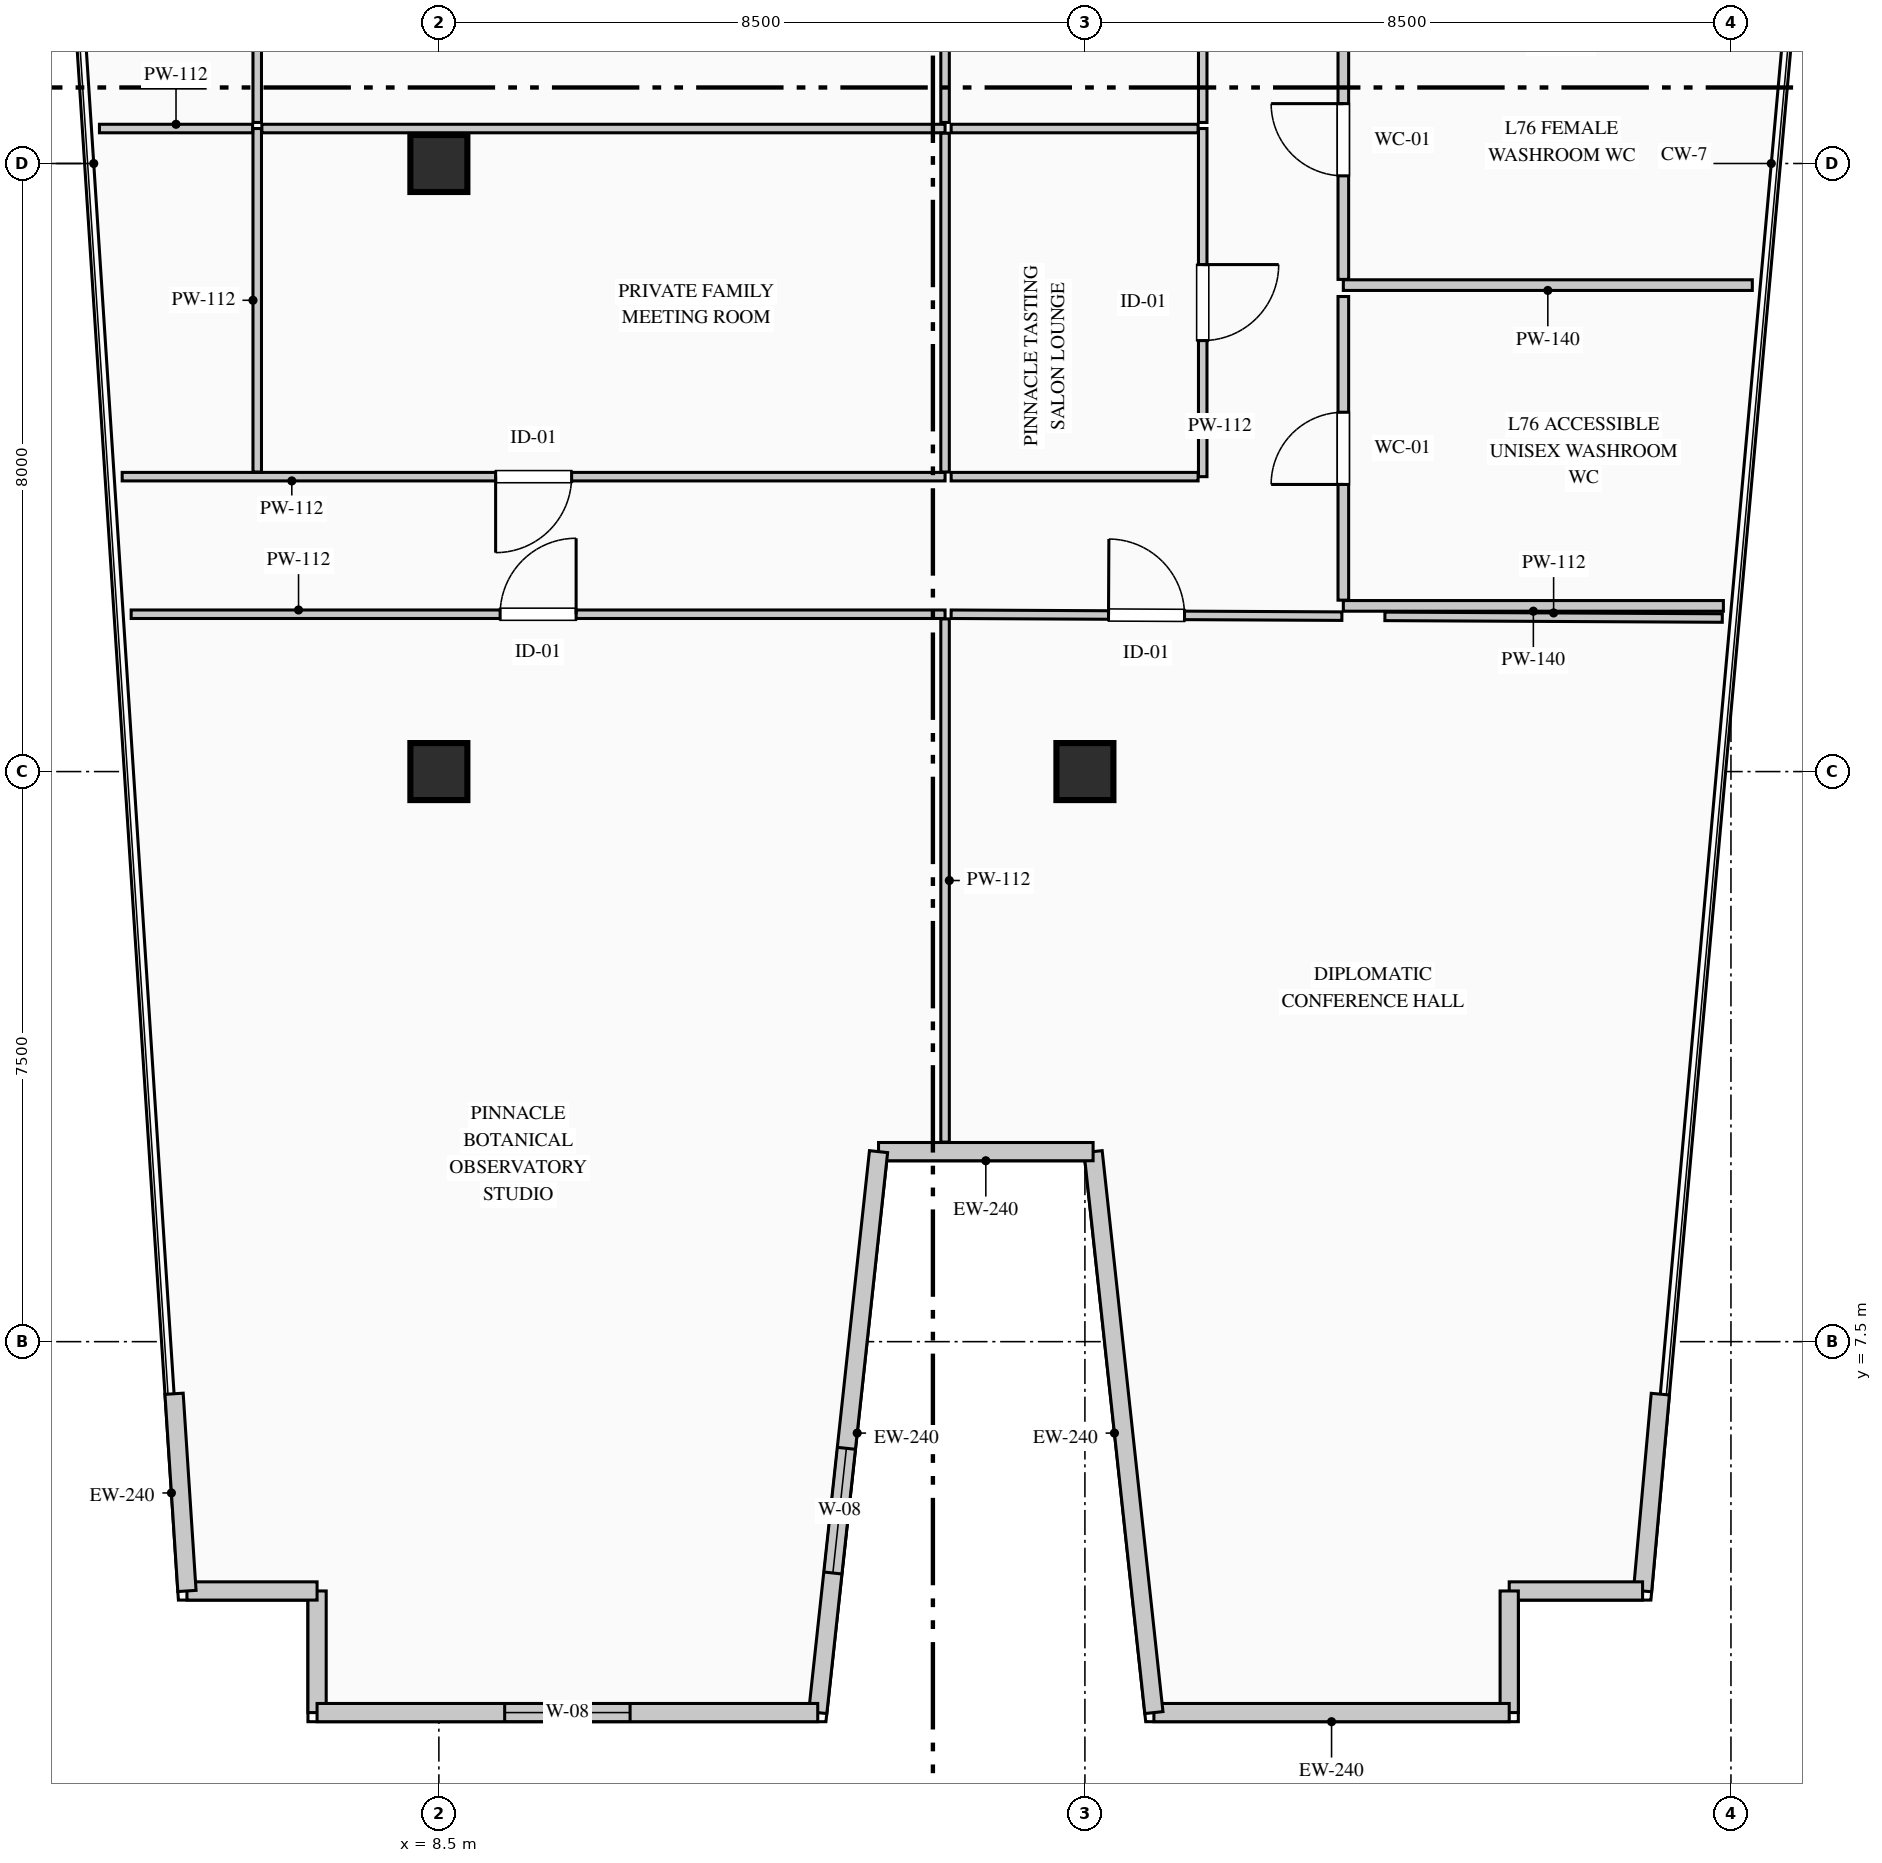
"""IFC4 building model, lengths in metres.
Left out: names, types, materials, properties, quantities, classifications, styles, units other than length and angle.
Written with IfcOpenShell. Run it as: python <this file> out.ifc"""

import sys

from ifc_helpers import new_model, si_unit, direction, frame, frame_2d, origin, origin_2d, place, context, subcontext, project, spatial, rectangle, extrude, element, fill, save


model = new_model("IFC4")
c1 = context("Model", 3, precision=1e-05, world=origin(), true_north=direction((0.0, 1.0)))
c2 = subcontext(c1, "Body", "Model", "MODEL_VIEW")
j1 = project(units=[si_unit("LENGTHUNIT", "METRE"), si_unit("PLANEANGLEUNIT", "RADIAN")], contexts=[c1])
p1 = place(None, origin())
s1 = spatial("IfcSite", under=j1, at=p1, CompositionType="ELEMENT")
p2 = place(p1, origin())
s2 = spatial("IfcBuilding", under=s1, at=p2, CompositionType="ELEMENT")
p3 = place(p2, frame((0.0, 0.0, 315.95)))
s3 = spatial("IfcBuildingStorey", under=s2, at=p3, CompositionType="ELEMENT", Elevation=315.95)
for number, where, z_axis, x_axis in (
    (1, (8.5, 15.0, 0.0), (0.0, 0.0, 1.0), (1.0, 0.0, 0.0)),
    (2, (8.5, 23.0, 0.0), (0.0, 0.0, 1.0), (1.0, 0.0, 0.0)),
    (3, (17.0, 15.0, 0.0), (0.0, 0.0, 1.0), (1.0, 0.0, 0.0)),
):
    element("IfcColumn", number, at=place(p3, frame(where, z_axis=z_axis, x_axis=x_axis)), inside=s3, PredefinedType="COLUMN", context=c2, shape_type="SweptSolid", body=[
        extrude(rectangle(XDim=0.75, YDim=0.75, at=origin_2d()), origin(), (0.0, 0.0, 1.0), 3.95),
    ])
p4 = place(p3, frame((6.897, 2.62, 0.0), z_axis=(0.0, 0.0, 1.0), x_axis=(0.0, 1.0, 0.0)))
e4 = element("IfcWall", 4, at=p4, inside=s3, PredefinedType="STANDARD", context=c2, shape_type="SweptSolid", body=[
    extrude(rectangle(XDim=1.6, YDim=0.24, at=frame_2d((0.8, 0.0))), origin(), (0.0, 0.0, 1.0), 3.7),
])
p5 = place(p3, frame((6.897, 4.22, 0.0), z_axis=(0.0, 0.0, 1.0), x_axis=(-1.0, 0.0, 0.0)))
e5 = element("IfcWall", 5, at=p5, inside=s3, PredefinedType="STANDARD", context=c2, shape_type="SweptSolid", body=[
    extrude(rectangle(XDim=1.712, YDim=0.24, at=frame_2d((0.856, 0.0))), origin(), (0.0, 0.0, 1.0), 3.7),
])
for number, where, z_axis, x_axis in (
    (6, (5.185, 4.22, 0.0), (0.0, 0.0, 1.0), (-0.065, 0.998, 0.0)),
    (7, (24.571, 6.81, 0.0), (0.0, 0.0, 1.0), (-0.09, -0.996, 0.0)),
):
    element("IfcWall", number, at=place(p3, frame(where, z_axis=z_axis, x_axis=x_axis)), inside=s3, PredefinedType="STANDARD", context=c2, shape_type="SweptSolid", body=[
        extrude(rectangle(XDim=2.6, YDim=0.24, at=frame_2d((1.3, 0.0))), origin(), (0.0, 0.0, 1.0), 3.7),
    ])
p6 = place(p3, frame((24.337, 4.22, 0.0), z_axis=(0.0, 0.0, 1.0), x_axis=(-1.0, 0.0, 0.0)))
e8 = element("IfcWall", 8, at=p6, inside=s3, PredefinedType="STANDARD", context=c2, shape_type="SweptSolid", body=[
    extrude(rectangle(XDim=1.755, YDim=0.24, at=frame_2d((0.877, 0.0))), origin(), (0.0, 0.0, 1.0), 3.7),
])
p7 = place(p3, frame((22.583, 4.22, 0.0), z_axis=(0.0, 0.0, 1.0), x_axis=(0.0, -1.0, 0.0)))
e9 = element("IfcWall", 9, at=p7, inside=s3, PredefinedType="STANDARD", context=c2, shape_type="SweptSolid", body=[
    extrude(rectangle(XDim=1.6, YDim=0.24, at=frame_2d((0.8, 0.0))), origin(), (0.0, 0.0, 1.0), 3.7),
])
p8 = place(p3, frame((22.583, 2.62, 0.0), z_axis=(0.0, 0.0, 1.0), x_axis=(-1.0, 0.0, 0.0)))
e10 = element("IfcWall", 10, at=p8, inside=s3, PredefinedType="STANDARD", context=c2, shape_type="SweptSolid", body=[
    extrude(rectangle(XDim=4.675, YDim=0.24, at=frame_2d((2.337, 0.0))), origin(), (0.0, 0.0, 1.0), 3.7),
])
p9 = place(p3, frame((17.908, 2.62, 0.0), z_axis=(0.0, 0.0, 1.0), x_axis=(-0.107777936076, 0.994174992894, 0.0)))
e11 = element("IfcWall", 11, at=p9, inside=s3, PredefinedType="STANDARD", context=c2, shape_type="SweptSolid", body=[
    extrude(rectangle(XDim=7.423, YDim=0.24, at=frame_2d((3.711, 0.0))), origin(), (0.0, 0.0, 1.0), 3.7),
])
p10 = place(p3, frame((17.108, 10.0, 0.0), z_axis=(0.0, 0.0, 1.0), x_axis=(-1.0, 0.0, 0.0)))
e12 = element("IfcWall", 12, at=p10, inside=s3, PredefinedType="STANDARD", context=c2, shape_type="SweptSolid", body=[
    extrude(rectangle(XDim=2.823, YDim=0.24, at=frame_2d((1.411, 0.0))), origin(), (0.0, 0.0, 1.0), 3.7),
])
p11 = place(p3, frame((14.285, 10.0, 0.0), z_axis=(0.0, 0.0, 1.0), x_axis=(-0.107777936076, -0.994174992894, 0.0)))
e13 = element("IfcWall", 13, at=p11, inside=s3, PredefinedType="STANDARD", context=c2, shape_type="SweptSolid", body=[
    extrude(rectangle(XDim=7.423, YDim=0.24, at=frame_2d((3.711, 0.0))), origin(), (0.0, 0.0, 1.0), 3.7),
])
p12 = place(p11, frame((3.926, 0.0, 0.9)))
e14 = element("IfcOpeningElement", 14, at=p12, cuts=e13, PredefinedType="OPENING", context=c2, shape_type="SweptSolid", body=[
    extrude(rectangle(XDim=1.65, YDim=1.95, at=frame_2d((0.825, 0.975))), frame((0.0, 0.13, 0.0), z_axis=(0.0, -1.0, 0.0), x_axis=(1.0, 0.0, 0.0)), (0.0, 0.0, 1.0), 0.26),
])
p13 = place(p3, frame((13.485, 2.62, 0.0), z_axis=(0.0, 0.0, 1.0), x_axis=(-1.0, 0.0, 0.0)))
e15 = element("IfcWall", 15, at=p13, inside=s3, PredefinedType="STANDARD", context=c2, shape_type="SweptSolid", body=[
    extrude(rectangle(XDim=6.587, YDim=0.24, at=frame_2d((3.294, 0.0))), origin(), (0.0, 0.0, 1.0), 3.7),
])
p14 = place(p13, frame((2.469, 0.0, 0.9)))
e16 = element("IfcOpeningElement", 16, at=p14, cuts=e15, PredefinedType="OPENING", context=c2, shape_type="SweptSolid", body=[
    extrude(rectangle(XDim=1.65, YDim=1.95, at=frame_2d((0.825, 0.975))), frame((0.0, 0.13, 0.0), z_axis=(0.0, -1.0, 0.0), x_axis=(1.0, 0.0, 0.0)), (0.0, 0.0, 1.0), 0.26),
])
p15 = place(p3, frame((25.781, 21.4, 0.0), z_axis=(0.0, 0.0, 1.0), x_axis=(-1.0, 0.0, 0.0)))
e17 = element("IfcWall", 17, at=p15, inside=s3, PredefinedType="PARTITIONING", context=c2, shape_type="SweptSolid", body=[
    extrude(rectangle(XDim=5.381, YDim=0.14, at=frame_2d((2.69, 0.0))), origin(), (0.0, 0.0, 1.0), 3.7),
])
p16 = place(p3, frame((20.4, 21.475, 0.0), z_axis=(0.0, 0.0, 1.0), x_axis=(0.0, 1.0, 0.0)))
e18 = element("IfcWall", 18, at=p16, inside=s3, PredefinedType="PARTITIONING", context=c2, shape_type="SweptSolid", body=[
    extrude(rectangle(XDim=3.675, YDim=0.14, at=frame_2d((1.837, 0.0))), origin(), (0.0, 0.0, 1.0), 3.7),
])
p17 = place(p16, frame((1.363, 0.0, 0.0)))
e19 = element("IfcOpeningElement", 19, at=p17, cuts=e18, PredefinedType="OPENING", context=c2, shape_type="SweptSolid", body=[
    extrude(rectangle(XDim=0.95, YDim=2.15, at=frame_2d((0.475, 1.075))), frame((0.0, 0.08, 0.0), z_axis=(0.0, -1.0, 0.0), x_axis=(1.0, 0.0, 0.0)), (0.0, 0.0, 1.0), 0.16),
])
p18 = place(p3, frame((25.4, 17.18, 0.0), z_axis=(0.0, 0.0, 1.0), x_axis=(-1.0, 0.0, 0.0)))
e20 = element("IfcWall", 20, at=p18, inside=s3, PredefinedType="PARTITIONING", context=c2, shape_type="SweptSolid", body=[
    extrude(rectangle(XDim=5.0, YDim=0.14, at=frame_2d((2.5, 0.0))), origin(), (0.0, 0.0, 1.0), 3.7),
])
p19 = place(p3, frame((20.4, 17.255, 0.0), z_axis=(0.0, 0.0, 1.0), x_axis=(0.0, 1.0, 0.0)))
e21 = element("IfcWall", 21, at=p19, inside=s3, PredefinedType="PARTITIONING", context=c2, shape_type="SweptSolid", body=[
    extrude(rectangle(XDim=3.995, YDim=0.14, at=frame_2d((1.998, 0.0))), origin(), (0.0, 0.0, 1.0), 3.7),
])
p20 = place(p19, frame((1.522, 0.0, 0.0)))
e22 = element("IfcOpeningElement", 22, at=p20, cuts=e21, PredefinedType="OPENING", context=c2, shape_type="SweptSolid", body=[
    extrude(rectangle(XDim=0.95, YDim=2.15, at=frame_2d((0.475, 1.075))), frame((0.0, 0.08, 0.0), z_axis=(0.0, -1.0, 0.0), x_axis=(1.0, 0.0, 0.0)), (0.0, 0.0, 1.0), 0.16),
])
p21 = place(p3, frame((4.451, 17.07, 0.0), z_axis=(0.0, 0.0, 1.0), x_axis=(1.0, 0.0, 0.0)))
e23 = element("IfcWall", 23, at=p21, inside=s3, PredefinedType="PARTITIONING", context=c2, shape_type="SweptSolid", body=[
    extrude(rectangle(XDim=10.708, YDim=0.112, at=frame_2d((5.354, 0.0))), origin(), (0.0, 0.0, 1.0), 3.7),
])
p22 = place(p21, frame((4.854, 0.0, 0.0)))
e24 = element("IfcOpeningElement", 24, at=p22, cuts=e23, PredefinedType="OPENING", context=c2, shape_type="SweptSolid", body=[
    extrude(rectangle(XDim=1.0, YDim=2.15, at=frame_2d((0.5, 1.075))), frame((0.0, 0.066, 0.0), z_axis=(0.0, -1.0, 0.0), x_axis=(1.0, 0.0, 0.0)), (0.0, 0.0, 1.0), 0.132),
])
p23 = place(p3, frame((15.16, 17.009, 0.0), z_axis=(0.0, 0.0, 1.0), x_axis=(0.0, -1.0, 0.0)))
e25 = element("IfcWall", 25, at=p23, inside=s3, PredefinedType="PARTITIONING", context=c2, shape_type="SweptSolid", body=[
    extrude(rectangle(XDim=6.884, YDim=0.112, at=frame_2d((3.442, 0.0))), origin(), (0.0, 0.0, 1.0), 3.7),
])
p24 = place(p3, frame((20.947, 17.042, 0.0), z_axis=(0.0, 0.0, 1.0), x_axis=(0.999988019942, -0.004894892409, 0.0)))
e26 = element("IfcWall", 26, at=p24, inside=s3, PredefinedType="PARTITIONING", context=c2, shape_type="SweptSolid", body=[
    extrude(rectangle(XDim=4.439, YDim=0.112, at=frame_2d((2.219, 0.0))), origin(), (0.0, 0.0, 1.0), 3.7),
])
p25 = place(p3, frame((15.24, 17.07, 0.0), z_axis=(0.0, 0.0, 1.0), x_axis=(0.999988036902, -0.0048914265, 0.0)))
e27 = element("IfcWall", 27, at=p25, inside=s3, PredefinedType="PARTITIONING", context=c2, shape_type="SweptSolid", body=[
    extrude(rectangle(XDim=5.141, YDim=0.112, at=frame_2d((2.57, 0.0))), origin(), (0.0, 0.0, 1.0), 3.7),
])
p26 = place(p25, frame((2.071, 0.0, 0.0)))
e28 = element("IfcOpeningElement", 28, at=p26, cuts=e27, PredefinedType="OPENING", context=c2, shape_type="SweptSolid", body=[
    extrude(rectangle(XDim=1.0, YDim=2.15, at=frame_2d((0.5, 1.075))), frame((0.0, 0.066, 0.0), z_axis=(0.0, -1.0, 0.0), x_axis=(1.0, 0.0, 0.0)), (0.0, 0.0, 1.0), 0.132),
])
p27 = place(p3, frame((15.16, 18.88, 0.0), z_axis=(0.0, 0.0, 1.0), x_axis=(-1.0, 0.0, 0.0)))
e29 = element("IfcWall", 29, at=p27, inside=s3, PredefinedType="PARTITIONING", context=c2, shape_type="SweptSolid", body=[
    extrude(rectangle(XDim=10.827, YDim=0.112, at=frame_2d((5.413, 0.0))), origin(), (0.0, 0.0, 1.0), 3.7),
])
p28 = place(p27, frame((4.913, 0.0, 0.0)))
e30 = element("IfcOpeningElement", 30, at=p28, cuts=e29, PredefinedType="OPENING", context=c2, shape_type="SweptSolid", body=[
    extrude(rectangle(XDim=1.0, YDim=2.15, at=frame_2d((0.5, 1.075))), frame((0.0, 0.066, 0.0), z_axis=(0.0, -1.0, 0.0), x_axis=(1.0, 0.0, 0.0)), (0.0, 0.0, 1.0), 0.132),
])
p29 = place(p3, frame((6.11, 18.941, 0.0), z_axis=(0.0, 0.0, 1.0), x_axis=(0.0, 1.0, 0.0)))
e31 = element("IfcWall", 31, at=p29, inside=s3, PredefinedType="PARTITIONING", context=c2, shape_type="SweptSolid", body=[
    extrude(rectangle(XDim=4.519, YDim=0.112, at=frame_2d((2.26, 0.0))), origin(), (0.0, 0.0, 1.0), 3.7),
])
p30 = place(p3, frame((4.034, 23.46, 0.0), z_axis=(0.0, 0.0, 1.0), x_axis=(1.0, 0.0, 0.0)))
e32 = element("IfcWall", 32, at=p30, inside=s3, PredefinedType="PARTITIONING", context=c2, shape_type="SweptSolid", body=[
    extrude(rectangle(XDim=2.015, YDim=0.112, at=frame_2d((1.007, 0.0))), origin(), (0.0, 0.0, 1.0), 3.7),
])
p31 = place(p3, frame((6.171, 23.46, 0.0), z_axis=(0.0, 0.0, 1.0), x_axis=(1.0, 0.0, 0.0)))
e33 = element("IfcWall", 33, at=p31, inside=s3, PredefinedType="PARTITIONING", context=c2, shape_type="SweptSolid", body=[
    extrude(rectangle(XDim=8.989, YDim=0.112, at=frame_2d((4.495, 0.0))), origin(), (0.0, 0.0, 1.0), 3.7),
])
p32 = place(p3, frame((15.16, 23.399, 0.0), z_axis=(0.0, 0.0, 1.0), x_axis=(0.0, -1.0, 0.0)))
e34 = element("IfcWall", 34, at=p32, inside=s3, PredefinedType="PARTITIONING", context=c2, shape_type="SweptSolid", body=[
    extrude(rectangle(XDim=4.458, YDim=0.112, at=frame_2d((2.229, 0.0))), origin(), (0.0, 0.0, 1.0), 3.7),
])
p33 = place(p3, frame((18.55, 23.46, 0.0), z_axis=(0.0, 0.0, 1.0), x_axis=(0.0, -1.0, 0.0)))
e35 = element("IfcWall", 35, at=p33, inside=s3, PredefinedType="PARTITIONING", context=c2, shape_type="SweptSolid", body=[
    extrude(rectangle(XDim=4.58, YDim=0.112, at=frame_2d((2.29, 0.0))), origin(), (0.0, 0.0, 1.0), 3.7),
])
p34 = place(p33, frame((1.79, 0.0, 0.0)))
e36 = element("IfcOpeningElement", 36, at=p34, cuts=e35, PredefinedType="OPENING", context=c2, shape_type="SweptSolid", body=[
    extrude(rectangle(XDim=1.0, YDim=2.15, at=frame_2d((0.5, 1.075))), frame((0.0, 0.066, 0.0), z_axis=(0.0, -1.0, 0.0), x_axis=(1.0, 0.0, 0.0)), (0.0, 0.0, 1.0), 0.132),
])
for number, where, z_axis, x_axis in (
    (37, (18.489, 18.88, 0.0), (0.0, 0.0, 1.0), (-1.0, 0.0, 0.0)),
    (38, (15.24, 23.46, 0.0), (0.0, 0.0, 1.0), (1.0, 0.0, 0.0)),
):
    element("IfcWall", number, at=place(p3, frame(where, z_axis=z_axis, x_axis=x_axis)), inside=s3, PredefinedType="PARTITIONING", context=c2, shape_type="SweptSolid", body=[
        extrude(rectangle(XDim=3.249, YDim=0.112, at=frame_2d((1.625, 0.0))), origin(), (0.0, 0.0, 1.0), 3.7),
    ])
for number, where, z_axis, x_axis in (
    (39, (15.16, 29.259, 0.0), (0.0, 0.0, 1.0), (0.0, -1.0, 0.0)),
    (40, (6.11, 23.54, 0.0), (0.0, 0.0, 1.0), (0.0, 1.0, 0.0)),
):
    element("IfcWall", number, at=place(p3, frame(where, z_axis=z_axis, x_axis=x_axis)), inside=s3, PredefinedType="PARTITIONING", context=c2, shape_type="SweptSolid", body=[
        extrude(rectangle(XDim=5.719, YDim=0.112, at=frame_2d((2.859, 0.0))), origin(), (0.0, 0.0, 1.0), 3.7),
    ])
p35 = place(p3, frame((18.55, 29.259, 0.0), z_axis=(0.0, 0.0, 1.0), x_axis=(0.0, -1.0, 0.0)))
e41 = element("IfcWall", 41, at=p35, inside=s3, PredefinedType="PARTITIONING", context=c2, shape_type="SweptSolid", body=[
    extrude(rectangle(XDim=5.719, YDim=0.112, at=frame_2d((2.859, 0.0))), origin(), (0.0, 0.0, 1.0), 3.7),
])
p36 = place(p35, frame((2.36, 0.0, 0.0)))
e42 = element("IfcOpeningElement", 42, at=p36, cuts=e41, PredefinedType="OPENING", context=c2, shape_type="SweptSolid", body=[
    extrude(rectangle(XDim=1.0, YDim=2.15, at=frame_2d((0.5, 1.075))), frame((0.0, 0.066, 0.0), z_axis=(0.0, -1.0, 0.0), x_axis=(1.0, 0.0, 0.0)), (0.0, 0.0, 1.0), 0.132),
])
p37 = place(p12, origin())
e43 = element("IfcWindow", 43, at=p37, inside=s3, PartitioningType="SINGLE_PANEL", PredefinedType="WINDOW", context=c2, shape_type="SweptSolid", body=[
    extrude(rectangle(XDim=1.65, YDim=1.95, at=frame_2d((0.825, 0.975))), frame((0.0, 0.03, 0.0), z_axis=(0.0, -1.0, 0.0), x_axis=(1.0, 0.0, 0.0)), (0.0, 0.0, 1.0), 0.06),
])
fill(e14, e43)
p38 = place(p14, origin())
e44 = element("IfcWindow", 44, at=p38, inside=s3, PartitioningType="SINGLE_PANEL", PredefinedType="WINDOW", context=c2, shape_type="SweptSolid", body=[
    extrude(rectangle(XDim=1.65, YDim=1.95, at=frame_2d((0.825, 0.975))), frame((0.0, 0.03, 0.0), z_axis=(0.0, -1.0, 0.0), x_axis=(1.0, 0.0, 0.0)), (0.0, 0.0, 1.0), 0.06),
])
fill(e16, e44)
p39 = place(p17, origin())
e45 = element("IfcDoor", 45, at=p39, inside=s3, OperationType="SINGLE_SWING_RIGHT", PredefinedType="DOOR", context=c2, shape_type="SweptSolid", body=[
    extrude(rectangle(XDim=0.95, YDim=2.15, at=frame_2d((0.475, 1.075))), frame((0.0, 0.025, 0.0), z_axis=(0.0, -1.0, 0.0), x_axis=(1.0, 0.0, 0.0)), (0.0, 0.0, 1.0), 0.05),
])
fill(e19, e45)
p40 = place(p20, origin())
e46 = element("IfcDoor", 46, at=p40, inside=s3, OperationType="SINGLE_SWING_LEFT", PredefinedType="DOOR", context=c2, shape_type="SweptSolid", body=[
    extrude(rectangle(XDim=0.95, YDim=2.15, at=frame_2d((0.475, 1.075))), frame((0.0, 0.025, 0.0), z_axis=(0.0, -1.0, 0.0), x_axis=(1.0, 0.0, 0.0)), (0.0, 0.0, 1.0), 0.05),
])
fill(e22, e46)
p41 = place(p22, origin())
e47 = element("IfcDoor", 47, at=p41, inside=s3, OperationType="SINGLE_SWING_RIGHT", PredefinedType="DOOR", context=c2, shape_type="SweptSolid", body=[
    extrude(rectangle(XDim=1.0, YDim=2.15, at=frame_2d((0.5, 1.075))), frame((0.0, 0.025, 0.0), z_axis=(0.0, -1.0, 0.0), x_axis=(1.0, 0.0, 0.0)), (0.0, 0.0, 1.0), 0.05),
])
fill(e24, e47)
p42 = place(p26, origin())
e48 = element("IfcDoor", 48, at=p42, inside=s3, OperationType="SINGLE_SWING_LEFT", PredefinedType="DOOR", context=c2, shape_type="SweptSolid", body=[
    extrude(rectangle(XDim=1.0, YDim=2.15, at=frame_2d((0.5, 1.075))), frame((0.0, 0.025, 0.0), z_axis=(0.0, -1.0, 0.0), x_axis=(1.0, 0.0, 0.0)), (0.0, 0.0, 1.0), 0.05),
])
fill(e28, e48)
p43 = place(p28, origin())
e49 = element("IfcDoor", 49, at=p43, inside=s3, OperationType="SINGLE_SWING_RIGHT", PredefinedType="DOOR", context=c2, shape_type="SweptSolid", body=[
    extrude(rectangle(XDim=1.0, YDim=2.15, at=frame_2d((0.5, 1.075))), frame((0.0, 0.025, 0.0), z_axis=(0.0, -1.0, 0.0), x_axis=(1.0, 0.0, 0.0)), (0.0, 0.0, 1.0), 0.05),
])
fill(e30, e49)
p44 = place(p34, origin())
e50 = element("IfcDoor", 50, at=p44, inside=s3, OperationType="SINGLE_SWING_LEFT", PredefinedType="DOOR", context=c2, shape_type="SweptSolid", body=[
    extrude(rectangle(XDim=1.0, YDim=2.15, at=frame_2d((0.5, 1.075))), frame((0.0, 0.025, 0.0), z_axis=(0.0, -1.0, 0.0), x_axis=(1.0, 0.0, 0.0)), (0.0, 0.0, 1.0), 0.05),
])
fill(e36, e50)
save(model, sys.argv[1])
